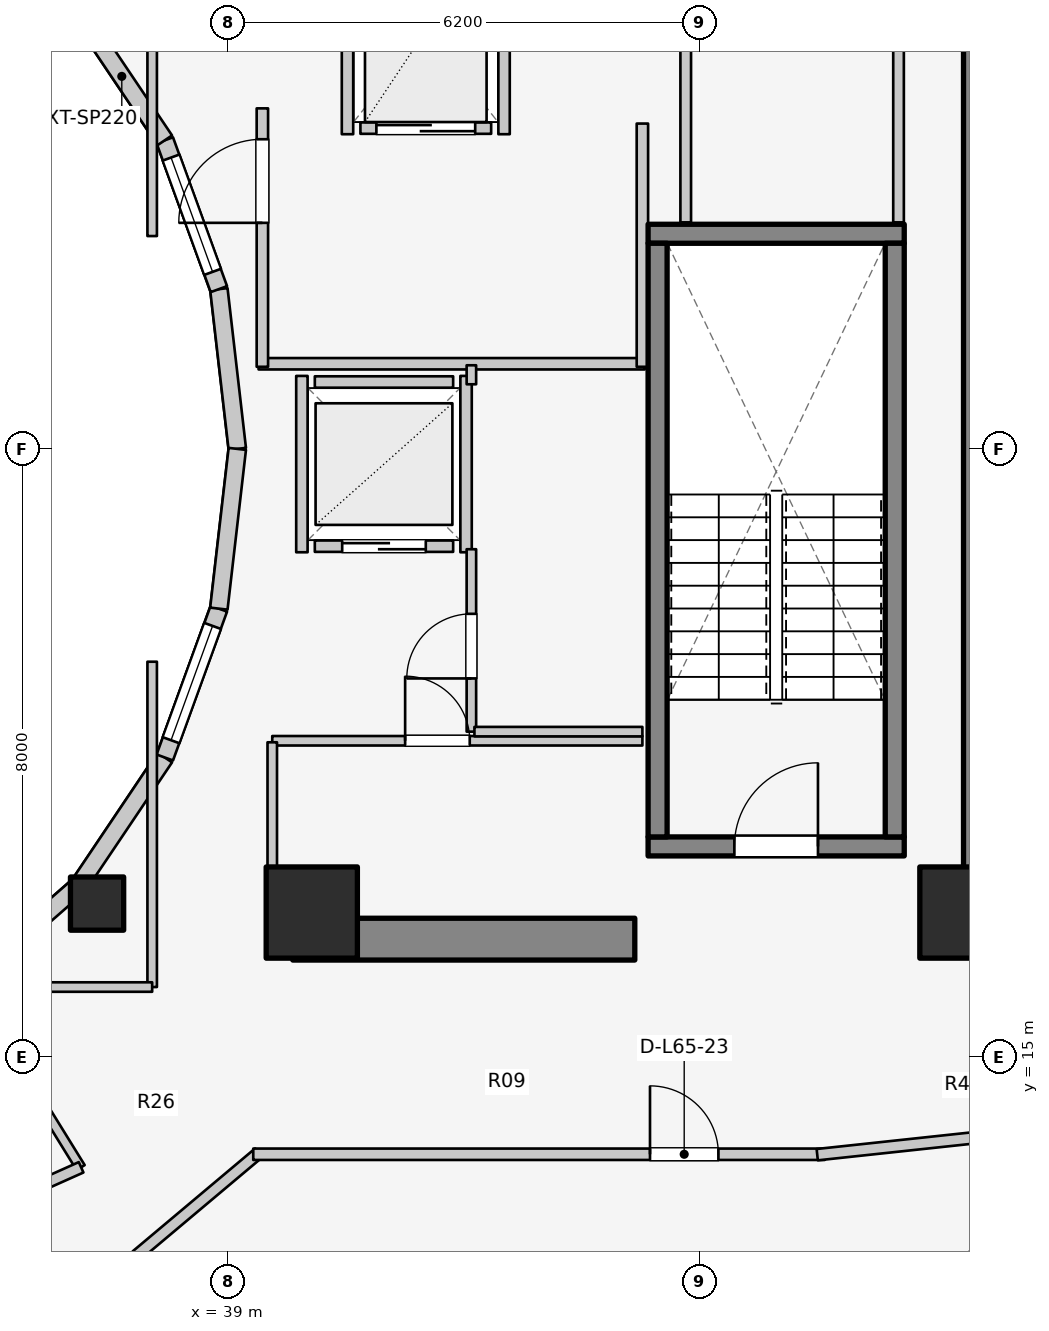
"""IFC4 building model, lengths in metres.
Left out: names, types, materials, properties, quantities, classifications, styles, units other than length and angle.
Written with IfcOpenShell. Run it as: python <this file> out.ifc"""

import sys

from ifc_helpers import new_model, si_unit, direction, frame, frame_2d, origin, origin_2d, place, context, subcontext, project, spatial, rectangle, extrude, element, fill, save


model = new_model("IFC4")
c1 = context("Model", 3, precision=1e-05, world=origin(), true_north=direction((0.0, 1.0)))
c2 = subcontext(c1, "Body", "Model", "MODEL_VIEW")
j1 = project(units=[si_unit("LENGTHUNIT", "METRE"), si_unit("PLANEANGLEUNIT", "RADIAN")], contexts=[c1])
p1 = place(None, origin())
s1 = spatial("IfcSite", under=j1, at=p1, CompositionType="ELEMENT")
p2 = place(p1, origin())
s2 = spatial("IfcBuilding", under=s1, at=p2, CompositionType="ELEMENT")
p3 = place(p2, frame((0.0, 0.0, 214.0)))
s3 = spatial("IfcBuildingStorey", under=s2, at=p3, CompositionType="ELEMENT", Elevation=214.0)
p4 = place(p3, frame((48.95, 17.05, 0.0), z_axis=(0.0, 0.0, 1.0), x_axis=(0.0, 1.0, 0.0)))
e1 = element("IfcWall", 1, at=p4, inside=s3, PredefinedType="SHEAR", context=c2, shape_type="SweptSolid", body=[
    extrude(rectangle(XDim=12.8, YDim=0.55, at=frame_2d((6.4, 0.0))), origin(), (0.0, 0.0, 1.0), 3.1),
])
p5 = place(p3, frame((39.85, 16.55, 0.0), z_axis=(0.0, 0.0, 1.0), x_axis=(1.0, 0.0, 0.0)))
e2 = element("IfcWall", 2, at=p5, inside=s3, PredefinedType="SHEAR", context=c2, shape_type="SweptSolid", body=[
    extrude(rectangle(XDim=4.5, YDim=0.55, at=frame_2d((2.25, 0.0))), origin(), (0.0, 0.0, 1.0), 3.1),
])
p6 = place(p3, frame((44.525, 17.77, 0.0), z_axis=(0.0, 0.0, 1.0), x_axis=(1.0, 0.0, 0.0)))
e3 = element("IfcWall", 3, at=p6, inside=s3, PredefinedType="SOLIDWALL", context=c2, shape_type="SweptSolid", body=[
    extrude(rectangle(XDim=3.37, YDim=0.25, at=frame_2d((1.685, 0.0))), origin(), (0.0, 0.0, 1.0), 3.1),
])
p7 = place(p6, frame((1.135, 0.0, 0.0)))
e4 = element("IfcOpeningElement", 4, at=p7, cuts=e3, PredefinedType="OPENING", context=c2, shape_type="SweptSolid", body=[
    extrude(rectangle(XDim=1.1, YDim=2.1, at=frame_2d((0.55, 1.05))), frame((0.0, 0.135, 0.0), z_axis=(0.0, -1.0, 0.0), x_axis=(1.0, 0.0, 0.0)), (0.0, 0.0, 1.0), 0.27),
])
p8 = place(p3, frame((44.525, 25.83, 0.0), z_axis=(0.0, 0.0, 1.0), x_axis=(1.0, 0.0, 0.0)))
e5 = element("IfcWall", 5, at=p8, inside=s3, PredefinedType="SOLIDWALL", context=c2, shape_type="SweptSolid", body=[
    extrude(rectangle(XDim=3.37, YDim=0.25, at=frame_2d((1.685, 0.0))), origin(), (0.0, 0.0, 1.0), 3.1),
])
for number, where, z_axis, x_axis in (
    (6, (44.65, 17.895, 0.0), (0.0, 0.0, 1.0), (0.0, 1.0, 0.0)),
    (7, (47.77, 17.895, 0.0), (0.0, 0.0, 1.0), (0.0, 1.0, 0.0)),
):
    element("IfcWall", number, at=place(p3, frame(where, z_axis=z_axis, x_axis=x_axis)), inside=s3, PredefinedType="SOLIDWALL", context=c2, shape_type="SweptSolid", body=[
        extrude(rectangle(XDim=7.81, YDim=0.25, at=frame_2d((3.905, 0.0))), origin(), (0.0, 0.0, 1.0), 3.1),
    ])
for number, where, z_axis, x_axis in (
    (8, (40.1, 16.9, 0.0), (0.0, 0.0, 1.0), (1.0, 0.0, 0.0)),
    (9, (48.7, 16.9, 0.0), (0.0, 0.0, 1.0), (1.0, 0.0, 0.0)),
):
    element("IfcColumn", number, at=place(p3, frame(where, z_axis=z_axis, x_axis=x_axis)), inside=s3, PredefinedType="COLUMN", context=c2, shape_type="SweptSolid", body=[
        extrude(rectangle(XDim=1.2, YDim=1.2, at=origin_2d()), origin(), (0.0, 0.0, 1.0), 3.1),
    ])
p9 = place(p3, frame((37.275, 17.018, 0.0), z_axis=(0.0, 0.0, 1.0), x_axis=(1.0, 0.0, 0.0)))
e10 = element("IfcColumn", 10, at=p9, inside=s3, PredefinedType="COLUMN", context=c2, shape_type="SweptSolid", body=[
    extrude(rectangle(XDim=0.7, YDim=0.7, at=origin_2d()), origin(), (0.0, 0.0, 1.0), 3.1),
])
p10 = place(p3, frame((39.12, 23.0, 0.0), z_axis=(0.0, 0.0, 1.0), x_axis=(-0.114711713601, 0.993398823617, 0.0)))
e11 = element("IfcWall", 11, at=p10, inside=s3, PredefinedType="STANDARD", context=c2, shape_type="SweptSolid", body=[
    extrude(rectangle(XDim=2.115, YDim=0.23, at=frame_2d((1.058, 0.0))), origin(), (0.0, 0.0, 1.0), 2.84),
])
p11 = place(p3, frame((38.877, 25.102, 0.0), z_axis=(0.0, 0.0, 1.0), x_axis=(-0.341423187295, 0.93990968033, 0.0)))
e12 = element("IfcWall", 12, at=p11, inside=s3, PredefinedType="STANDARD", context=c2, shape_type="SweptSolid", body=[
    extrude(rectangle(XDim=2.084, YDim=0.23, at=frame_2d((1.042, 0.0))), origin(), (0.0, 0.0, 1.0), 2.84),
])
p12 = place(p11, frame((0.242, 0.0, 0.85)))
e13 = element("IfcOpeningElement", 13, at=p12, cuts=e12, PredefinedType="OPENING", context=c2, shape_type="SweptSolid", body=[
    extrude(rectangle(XDim=1.6, YDim=1.65, at=frame_2d((0.8, 0.825))), frame((0.0, 0.125, 0.0), z_axis=(0.0, -1.0, 0.0), x_axis=(1.0, 0.0, 0.0)), (0.0, 0.0, 1.0), 0.25),
])
p13 = place(p3, frame((38.166, 27.06, 0.0), z_axis=(0.0, 0.0, 1.0), x_axis=(-0.558197800898, 0.829707909492, 0.0)))
e14 = element("IfcWall", 14, at=p13, inside=s3, PredefinedType="STANDARD", context=c2, shape_type="SweptSolid", body=[
    extrude(rectangle(XDim=2.027, YDim=0.23, at=frame_2d((1.013, 0.0))), origin(), (0.0, 0.0, 1.0), 2.16),
])
p14 = place(p3, frame((35.56, 15.968, 0.0), z_axis=(0.0, 0.0, 1.0), x_axis=(0.752576694707, 0.658504607869, 0.0)))
e15 = element("IfcWall", 15, at=p14, inside=s3, PredefinedType="STANDARD", context=c2, shape_type="SweptSolid", body=[
    extrude(rectangle(XDim=1.959, YDim=0.23, at=frame_2d((0.98, 0.0))), origin(), (0.0, 0.0, 1.0), 2.16),
])
p15 = place(p3, frame((37.035, 17.258, 0.0), z_axis=(0.0, 0.0, 1.0), x_axis=(0.558197800898, 0.829707909492, 0.0)))
e16 = element("IfcWall", 16, at=p15, inside=s3, PredefinedType="STANDARD", context=c2, shape_type="SweptSolid", body=[
    extrude(rectangle(XDim=2.027, YDim=0.23, at=frame_2d((1.013, 0.0))), origin(), (0.0, 0.0, 1.0), 2.16),
])
p16 = place(p3, frame((38.166, 18.94, 0.0), z_axis=(0.0, 0.0, 1.0), x_axis=(0.341423187295, 0.93990968033, 0.0)))
e17 = element("IfcWall", 17, at=p16, inside=s3, PredefinedType="STANDARD", context=c2, shape_type="SweptSolid", body=[
    extrude(rectangle(XDim=2.084, YDim=0.23, at=frame_2d((1.042, 0.0))), origin(), (0.0, 0.0, 1.0), 2.84),
])
p17 = place(p16, frame((0.242, 0.0, 0.85)))
e18 = element("IfcOpeningElement", 18, at=p17, cuts=e17, PredefinedType="OPENING", context=c2, shape_type="SweptSolid", body=[
    extrude(rectangle(XDim=1.6, YDim=1.65, at=frame_2d((0.8, 0.825))), frame((0.0, 0.125, 0.0), z_axis=(0.0, -1.0, 0.0), x_axis=(1.0, 0.0, 0.0)), (0.0, 0.0, 1.0), 0.25),
])
p18 = place(p3, frame((38.877, 20.898, 0.0), z_axis=(0.0, 0.0, 1.0), x_axis=(0.114711713601, 0.993398823617, 0.0)))
e19 = element("IfcWall", 19, at=p18, inside=s3, PredefinedType="STANDARD", context=c2, shape_type="SweptSolid", body=[
    extrude(rectangle(XDim=2.115, YDim=0.23, at=frame_2d((1.058, 0.0))), origin(), (0.0, 0.0, 1.0), 2.84),
])
p19 = place(p3, frame((47.558, 11.128, 0.0), z_axis=(0.0, 0.0, 1.0), x_axis=(0.72731899451, 0.686299555752, 0.0)))
e20 = element("IfcWall", 20, at=p19, inside=s3, PredefinedType="STANDARD", context=c2, shape_type="SweptSolid", body=[
    extrude(rectangle(XDim=4.404, YDim=0.26, at=frame_2d((2.202, 0.0))), origin(), (0.0, 0.0, 1.0), 2.85),
])
p20 = place(p19, frame((1.452, 0.0, 0.75)))
e21 = element("IfcOpeningElement", 21, at=p20, cuts=e20, PredefinedType="OPENING", context=c2, shape_type="SweptSolid", body=[
    extrude(rectangle(XDim=1.5, YDim=1.6, at=frame_2d((0.75, 0.8))), frame((0.0, 0.14, 0.0), z_axis=(0.0, -1.0, 0.0), x_axis=(1.0, 0.0, 0.0)), (0.0, 0.0, 1.0), 0.28),
])
p21 = place(p3, frame((40.14, 21.72, 0.0), z_axis=(0.0, 0.0, 1.0), x_axis=(1.0, 0.0, 0.0)))
e22 = element("IfcWall", 22, at=p21, inside=s3, PredefinedType="SOLIDWALL", context=c2, shape_type="SweptSolid", body=[
    extrude(rectangle(XDim=1.82, YDim=0.15, at=frame_2d((0.91, 0.0))), origin(), (0.0, 0.0, 1.0), 2.12),
])
p22 = place(p21, frame((0.36, 0.0, 0.0)))
e23 = element("IfcOpeningElement", 23, at=p22, cuts=e22, PredefinedType="OPENING", context=c2, shape_type="SweptSolid", body=[
    extrude(rectangle(XDim=1.1, YDim=2.1, at=frame_2d((0.55, 1.05))), frame((0.0, 0.085, 0.0), z_axis=(0.0, -1.0, 0.0), x_axis=(1.0, 0.0, 0.0)), (0.0, 0.0, 1.0), 0.17),
])
p23 = place(p3, frame((40.14, 23.88, 0.0), z_axis=(0.0, 0.0, 1.0), x_axis=(1.0, 0.0, 0.0)))
e24 = element("IfcWall", 24, at=p23, inside=s3, PredefinedType="SOLIDWALL", context=c2, shape_type="SweptSolid", body=[
    extrude(rectangle(XDim=1.82, YDim=0.15, at=frame_2d((0.91, 0.0))), origin(), (0.0, 0.0, 1.0), 2.12),
])
p24 = place(p3, frame((39.97, 21.64, 0.0), z_axis=(0.0, 0.0, 1.0), x_axis=(0.0, 1.0, 0.0)))
e25 = element("IfcWall", 25, at=p24, inside=s3, PredefinedType="SOLIDWALL", context=c2, shape_type="SweptSolid", body=[
    extrude(rectangle(XDim=2.32, YDim=0.15, at=frame_2d((1.16, 0.0))), origin(), (0.0, 0.0, 1.0), 2.12),
])
p25 = place(p3, frame((42.13, 21.64, 0.0), z_axis=(0.0, 0.0, 1.0), x_axis=(0.0, 1.0, 0.0)))
e26 = element("IfcWall", 26, at=p25, inside=s3, PredefinedType="SOLIDWALL", context=c2, shape_type="SweptSolid", body=[
    extrude(rectangle(XDim=2.32, YDim=0.15, at=frame_2d((1.16, 0.0))), origin(), (0.0, 0.0, 1.0), 2.855),
])
p26 = place(p3, frame((40.74, 27.22, 0.0), z_axis=(0.0, 0.0, 1.0), x_axis=(1.0, 0.0, 0.0)))
e27 = element("IfcWall", 27, at=p26, inside=s3, PredefinedType="SOLIDWALL", context=c2, shape_type="SweptSolid", body=[
    extrude(rectangle(XDim=1.72, YDim=0.15, at=frame_2d((0.86, 0.0))), origin(), (0.0, 0.0, 1.0), 2.855),
])
p27 = place(p26, frame((0.21, 0.0, 0.0)))
e28 = element("IfcOpeningElement", 28, at=p27, cuts=e27, PredefinedType="OPENING", context=c2, shape_type="SweptSolid", body=[
    extrude(rectangle(XDim=1.3, YDim=2.1, at=frame_2d((0.65, 1.05))), frame((0.0, 0.085, 0.0), z_axis=(0.0, -1.0, 0.0), x_axis=(1.0, 0.0, 0.0)), (0.0, 0.0, 1.0), 0.17),
])
for number, where, z_axis, x_axis in (
    (29, (40.57, 27.14, 0.0), (0.0, 0.0, 1.0), (0.0, 1.0, 0.0)),
    (30, (42.63, 27.14, 0.0), (0.0, 0.0, 1.0), (0.0, 1.0, 0.0)),
):
    element("IfcWall", number, at=place(p3, frame(where, z_axis=z_axis, x_axis=x_axis)), inside=s3, PredefinedType="SOLIDWALL", context=c2, shape_type="SweptSolid", body=[
        extrude(rectangle(XDim=2.72, YDim=0.15, at=frame_2d((1.36, 0.0))), origin(), (0.0, 0.0, 1.0), 2.855),
    ])
p28 = place(p3, frame((39.4, 24.12, 0.0), z_axis=(0.0, 0.0, 1.0), x_axis=(1.0, 0.0, 0.0)))
e31 = element("IfcWall", 31, at=p28, inside=s3, PredefinedType="PARTITIONING", context=c2, shape_type="SweptSolid", body=[
    extrude(rectangle(XDim=5.08, YDim=0.15, at=frame_2d((2.54, 0.0))), origin(), (0.0, 0.0, 1.0), 2.12),
])
p29 = place(p3, frame((44.45, 24.08, 0.0), z_axis=(0.0, 0.0, 1.0), x_axis=(0.0, 1.0, 0.0)))
e32 = element("IfcWall", 32, at=p29, inside=s3, PredefinedType="PARTITIONING", context=c2, shape_type="SweptSolid", body=[
    extrude(rectangle(XDim=3.2, YDim=0.15, at=frame_2d((1.6, 0.0))), origin(), (0.0, 0.0, 1.0), 2.855),
])
p30 = place(p3, frame((39.45, 24.08, 0.0), z_axis=(0.0, 0.0, 1.0), x_axis=(0.0, 1.0, 0.0)))
e33 = element("IfcWall", 33, at=p30, inside=s3, PredefinedType="PARTITIONING", context=c2, shape_type="SweptSolid", body=[
    extrude(rectangle(XDim=3.4, YDim=0.15, at=frame_2d((1.7, 0.0))), origin(), (0.0, 0.0, 1.0), 2.855),
])
p31 = place(p30, frame((1.894, 0.0, 0.0)))
e34 = element("IfcOpeningElement", 34, at=p31, cuts=e33, PredefinedType="OPENING", context=c2, shape_type="SweptSolid", body=[
    extrude(rectangle(XDim=1.1, YDim=2.1, at=frame_2d((0.55, 1.05))), frame((0.0, 0.085, 0.0), z_axis=(0.0, -1.0, 0.0), x_axis=(1.0, 0.0, 0.0)), (0.0, 0.0, 1.0), 0.17),
])
p32 = place(p3, frame((39.58, 19.16, 0.0), z_axis=(0.0, 0.0, 1.0), x_axis=(1.0, 0.0, 0.0)))
e35 = element("IfcWall", 35, at=p32, inside=s3, PredefinedType="PARTITIONING", context=c2, shape_type="SweptSolid", body=[
    extrude(rectangle(XDim=4.87, YDim=0.125, at=frame_2d((2.435, 0.0))), origin(), (0.0, 0.0, 1.0), 2.12),
])
p33 = place(p32, frame((1.748, 0.0, 0.0)))
e36 = element("IfcOpeningElement", 36, at=p33, cuts=e35, PredefinedType="OPENING", context=c2, shape_type="SweptSolid", body=[
    extrude(rectangle(XDim=0.85, YDim=2.05, at=frame_2d((0.425, 1.025))), frame((0.0, 0.073, 0.0), z_axis=(0.0, -1.0, 0.0), x_axis=(1.0, 0.0, 0.0)), (0.0, 0.0, 1.0), 0.145),
])
p34 = place(p3, frame((39.58, 17.1, 0.0), z_axis=(0.0, 0.0, 1.0), x_axis=(0.0, 1.0, 0.0)))
e37 = element("IfcWall", 37, at=p34, inside=s3, PredefinedType="PARTITIONING", context=c2, shape_type="SweptSolid", body=[
    extrude(rectangle(XDim=2.04, YDim=0.125, at=frame_2d((1.02, 0.0))), origin(), (0.0, 0.0, 1.0), 2.232),
])
p35 = place(p3, frame((42.2, 19.28, 0.0), z_axis=(0.0, 0.0, 1.0), x_axis=(0.0, 1.0, 0.0)))
e38 = element("IfcWall", 38, at=p35, inside=s3, PredefinedType="PARTITIONING", context=c2, shape_type="SweptSolid", body=[
    extrude(rectangle(XDim=2.4, YDim=0.125, at=frame_2d((1.2, 0.0))), origin(), (0.0, 0.0, 1.0), 2.855),
])
p36 = place(p35, frame((0.7, 0.0, 0.0)))
e39 = element("IfcOpeningElement", 39, at=p36, cuts=e38, PredefinedType="OPENING", context=c2, shape_type="SweptSolid", body=[
    extrude(rectangle(XDim=0.85, YDim=2.05, at=frame_2d((0.425, 1.025))), frame((0.0, 0.073, 0.0), z_axis=(0.0, -1.0, 0.0), x_axis=(1.0, 0.0, 0.0)), (0.0, 0.0, 1.0), 0.145),
])
p37 = place(p3, frame((42.2, 23.85, 0.0), z_axis=(0.0, 0.0, 1.0), x_axis=(0.0, 1.0, 0.0)))
e40 = element("IfcWall", 40, at=p37, inside=s3, PredefinedType="PARTITIONING", context=c2, shape_type="SweptSolid", body=[
    extrude(rectangle(XDim=0.25, YDim=0.125, at=frame_2d((0.125, 0.0))), origin(), (0.0, 0.0, 1.0), 2.855),
])
p38 = place(p3, frame((42.24, 19.28, 0.0), z_axis=(0.0, 0.0, 1.0), x_axis=(1.0, 0.0, 0.0)))
e41 = element("IfcWall", 41, at=p38, inside=s3, PredefinedType="PARTITIONING", context=c2, shape_type="SweptSolid", body=[
    extrude(rectangle(XDim=2.21, YDim=0.125, at=frame_2d((1.105, 0.0))), origin(), (0.0, 0.0, 1.0), 2.12),
])
for number, where, z_axis, x_axis in (
    (42, (45.02, 25.98, 0.0), (0.0, 0.0, 1.0), (0.0, 1.0, 0.0)),
    (43, (47.82, 25.98, 0.0), (0.0, 0.0, 1.0), (0.0, 1.0, 0.0)),
):
    element("IfcWall", number, at=place(p3, frame(where, z_axis=z_axis, x_axis=x_axis)), inside=s3, PredefinedType="PLUMBINGWALL", context=c2, shape_type="SweptSolid", body=[
        extrude(rectangle(XDim=3.88, YDim=0.14, at=frame_2d((1.94, 0.0))), origin(), (0.0, 0.0, 1.0), 2.855),
    ])
p39 = place(p3, frame((35.55, 15.985, 0.0), z_axis=(0.0, 0.0, 1.0), x_axis=(0.52592395012, -0.850531597702, 0.0)))
e44 = element("IfcWall", 44, at=p39, inside=s3, PredefinedType="PARTITIONING", context=c2, shape_type="SweptSolid", body=[
    extrude(rectangle(XDim=2.869, YDim=0.125, at=frame_2d((1.435, 0.0))), origin(), (0.0, 0.0, 1.0), 2.376),
])
p40 = place(p3, frame((34.617, 12.454, 0.0), z_axis=(0.0, 0.0, 1.0), x_axis=(0.912859324183, 0.408274239027, 0.0)))
e45 = element("IfcWall", 45, at=p40, inside=s3, PredefinedType="PARTITIONING", context=c2, shape_type="SweptSolid", body=[
    extrude(rectangle(XDim=2.682, YDim=0.15, at=frame_2d((1.341, 0.0))), origin(), (0.0, 0.0, 1.0), 2.376),
])
p41 = place(p40, frame((0.866, 0.0, 0.0)))
e46 = element("IfcOpeningElement", 46, at=p41, cuts=e45, PredefinedType="OPENING", context=c2, shape_type="SweptSolid", body=[
    extrude(rectangle(XDim=0.95, YDim=2.1, at=frame_2d((0.475, 1.05))), frame((0.0, 0.085, 0.0), z_axis=(0.0, -1.0, 0.0), x_axis=(1.0, 0.0, 0.0)), (0.0, 0.0, 1.0), 0.17),
])
p42 = place(p3, frame((38.0, 25.8, 0.0), z_axis=(0.0, 0.0, 1.0), x_axis=(0.0, 1.0, 0.0)))
e47 = element("IfcWall", 47, at=p42, inside=s3, PredefinedType="PARTITIONING", context=c2, shape_type="SweptSolid", body=[
    extrude(rectangle(XDim=5.16, YDim=0.125, at=frame_2d((2.58, 0.0))), origin(), (0.0, 0.0, 1.0), 2.232),
])
p43 = place(p3, frame((38.0, 15.92, 0.0), z_axis=(0.0, 0.0, 1.0), x_axis=(0.0, 1.0, 0.0)))
e48 = element("IfcWall", 48, at=p43, inside=s3, PredefinedType="PARTITIONING", context=c2, shape_type="SweptSolid", body=[
    extrude(rectangle(XDim=4.28, YDim=0.125, at=frame_2d((2.14, 0.0))), origin(), (0.0, 0.0, 1.0), 2.232),
])
p44 = place(p3, frame((35.4, 15.92, 0.0), z_axis=(0.0, 0.0, 1.0), x_axis=(1.0, 0.0, 0.0)))
e49 = element("IfcWall", 49, at=p44, inside=s3, PredefinedType="PARTITIONING", context=c2, shape_type="SweptSolid", body=[
    extrude(rectangle(XDim=2.6, YDim=0.125, at=frame_2d((1.3, 0.0))), origin(), (0.0, 0.0, 1.0), 2.232),
])
p45 = place(p3, frame((37.791, 12.385, 0.0), z_axis=(0.0, 0.0, 1.0), x_axis=(0.765677451641, 0.643224719711, 0.0)))
e50 = element("IfcWall", 50, at=p45, inside=s3, PredefinedType="PARTITIONING", context=c2, shape_type="SweptSolid", body=[
    extrude(rectangle(XDim=2.105, YDim=0.15, at=frame_2d((1.053, 0.0))), origin(), (0.0, 0.0, 1.0), 2.376),
])
p46 = place(p3, frame((39.33, 13.72, 0.0), z_axis=(0.0, 0.0, 1.0), x_axis=(1.0, 0.0, 0.0)))
e51 = element("IfcWall", 51, at=p46, inside=s3, PredefinedType="PARTITIONING", context=c2, shape_type="SweptSolid", body=[
    extrude(rectangle(XDim=7.52, YDim=0.15, at=frame_2d((3.76, 0.0))), origin(), (0.0, 0.0, 1.0), 2.376),
])
p47 = place(p46, frame((5.22, 0.0, 0.0)))
e52 = element("IfcOpeningElement", 52, at=p47, cuts=e51, PredefinedType="OPENING", context=c2, shape_type="SweptSolid", body=[
    extrude(rectangle(XDim=0.9, YDim=2.1, at=frame_2d((0.45, 1.05))), frame((0.0, 0.085, 0.0), z_axis=(0.0, -1.0, 0.0), x_axis=(1.0, 0.0, 0.0)), (0.0, 0.0, 1.0), 0.17),
])
p48 = place(p3, frame((46.75, 13.715, 0.0), z_axis=(0.0, 0.0, 1.0), x_axis=(0.994275802046, 0.106843949134, 0.0)))
e53 = element("IfcWall", 53, at=p48, inside=s3, PredefinedType="PARTITIONING", context=c2, shape_type="SweptSolid", body=[
    extrude(rectangle(XDim=4.049, YDim=0.15, at=frame_2d((2.024, 0.0))), origin(), (0.0, 0.0, 1.0), 2.22),
])
p49 = place(p12, origin())
e54 = element("IfcWindow", 54, at=p49, inside=s3, PartitioningType="SINGLE_PANEL", PredefinedType="WINDOW", context=c2, shape_type="SweptSolid", body=[
    extrude(rectangle(XDim=1.6, YDim=1.65, at=frame_2d((0.8, 0.825))), frame((0.0, 0.03, 0.0), z_axis=(0.0, -1.0, 0.0), x_axis=(1.0, 0.0, 0.0)), (0.0, 0.0, 1.0), 0.06),
])
fill(e13, e54)
p50 = place(p17, origin())
e55 = element("IfcWindow", 55, at=p50, inside=s3, PartitioningType="SINGLE_PANEL", PredefinedType="WINDOW", context=c2, shape_type="SweptSolid", body=[
    extrude(rectangle(XDim=1.6, YDim=1.65, at=frame_2d((0.8, 0.825))), frame((0.0, 0.03, 0.0), z_axis=(0.0, -1.0, 0.0), x_axis=(1.0, 0.0, 0.0)), (0.0, 0.0, 1.0), 0.06),
])
fill(e18, e55)
p51 = place(p20, origin())
e56 = element("IfcWindow", 56, at=p51, inside=s3, PartitioningType="SINGLE_PANEL", PredefinedType="WINDOW", context=c2, shape_type="SweptSolid", body=[
    extrude(rectangle(XDim=1.5, YDim=1.6, at=frame_2d((0.75, 0.8))), frame((0.0, 0.03, 0.0), z_axis=(0.0, -1.0, 0.0), x_axis=(1.0, 0.0, 0.0)), (0.0, 0.0, 1.0), 0.06),
])
fill(e21, e56)
p52 = place(p7, origin())
e57 = element("IfcDoor", 57, at=p52, inside=s3, OperationType="SINGLE_SWING_RIGHT", PredefinedType="DOOR", context=c2, shape_type="SweptSolid", body=[
    extrude(rectangle(XDim=1.1, YDim=2.1, at=frame_2d((0.55, 1.05))), frame((0.0, 0.025, 0.0), z_axis=(0.0, -1.0, 0.0), x_axis=(1.0, 0.0, 0.0)), (0.0, 0.0, 1.0), 0.05),
])
fill(e4, e57)
p53 = place(p22, origin())
e58 = element("IfcDoor", 58, at=p53, inside=s3, OperationType="DOUBLE_DOOR_SLIDING", PredefinedType="DOOR", context=c2, shape_type="SweptSolid", body=[
    extrude(rectangle(XDim=1.1, YDim=2.1, at=frame_2d((0.55, 1.05))), frame((0.0, 0.025, 0.0), z_axis=(0.0, -1.0, 0.0), x_axis=(1.0, 0.0, 0.0)), (0.0, 0.0, 1.0), 0.05),
])
fill(e23, e58)
p54 = place(p27, origin())
e59 = element("IfcDoor", 59, at=p54, inside=s3, OperationType="DOUBLE_DOOR_SLIDING", PredefinedType="DOOR", context=c2, shape_type="SweptSolid", body=[
    extrude(rectangle(XDim=1.3, YDim=2.1, at=frame_2d((0.65, 1.05))), frame((0.0, 0.025, 0.0), z_axis=(0.0, -1.0, 0.0), x_axis=(1.0, 0.0, 0.0)), (0.0, 0.0, 1.0), 0.05),
])
fill(e28, e59)
p55 = place(p31, origin())
e60 = element("IfcDoor", 60, at=p55, inside=s3, OperationType="SINGLE_SWING_LEFT", PredefinedType="DOOR", context=c2, shape_type="SweptSolid", body=[
    extrude(rectangle(XDim=1.1, YDim=2.1, at=frame_2d((0.55, 1.05))), frame((0.0, 0.025, 0.0), z_axis=(0.0, -1.0, 0.0), x_axis=(1.0, 0.0, 0.0)), (0.0, 0.0, 1.0), 0.05),
])
fill(e34, e60)
p56 = place(p33, origin())
e61 = element("IfcDoor", 61, at=p56, inside=s3, OperationType="SINGLE_SWING_LEFT", PredefinedType="DOOR", context=c2, shape_type="SweptSolid", body=[
    extrude(rectangle(XDim=0.85, YDim=2.05, at=frame_2d((0.425, 1.025))), frame((0.0, 0.025, 0.0), z_axis=(0.0, -1.0, 0.0), x_axis=(1.0, 0.0, 0.0)), (0.0, 0.0, 1.0), 0.05),
])
fill(e36, e61)
p57 = place(p36, origin())
e62 = element("IfcDoor", 62, at=p57, inside=s3, OperationType="SINGLE_SWING_LEFT", PredefinedType="DOOR", context=c2, shape_type="SweptSolid", body=[
    extrude(rectangle(XDim=0.85, YDim=2.05, at=frame_2d((0.425, 1.025))), frame((0.0, 0.025, 0.0), z_axis=(0.0, -1.0, 0.0), x_axis=(1.0, 0.0, 0.0)), (0.0, 0.0, 1.0), 0.05),
])
fill(e39, e62)
p58 = place(p47, origin())
e63 = element("IfcDoor", 63, at=p58, inside=s3, OperationType="SINGLE_SWING_LEFT", PredefinedType="DOOR", context=c2, shape_type="SweptSolid", body=[
    extrude(rectangle(XDim=0.9, YDim=2.1, at=frame_2d((0.45, 1.05))), frame((0.0, 0.025, 0.0), z_axis=(0.0, -1.0, 0.0), x_axis=(1.0, 0.0, 0.0)), (0.0, 0.0, 1.0), 0.05),
])
fill(e52, e63)
save(model, sys.argv[1])
